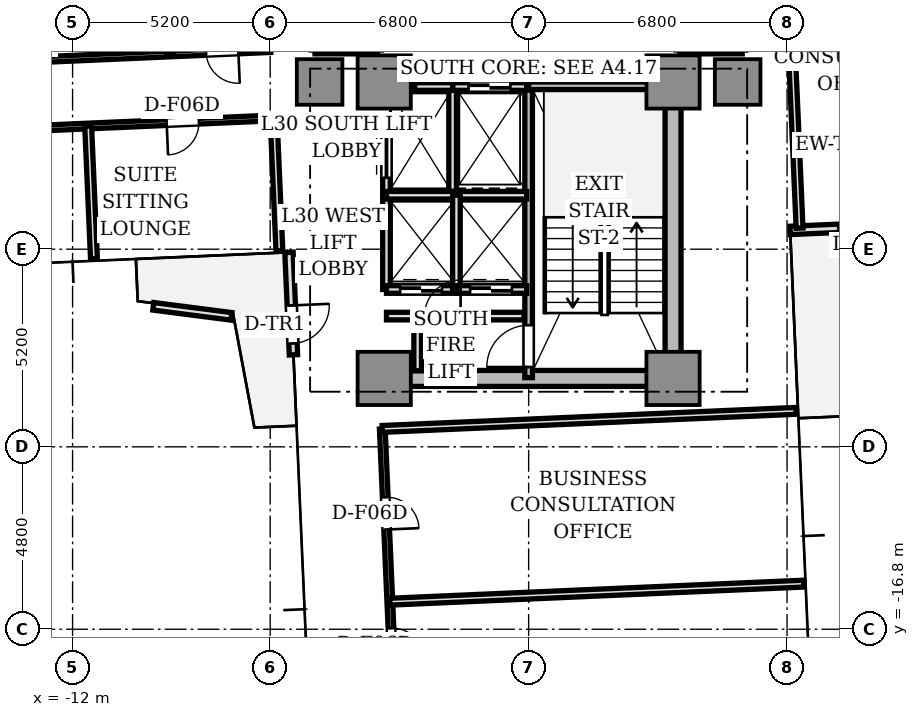
"""IFC4 building model, lengths in metres.
Left out: names, types, materials, properties, quantities, classifications, styles, units other than length and angle.
Written with IfcOpenShell. Run it as: python <this file> out.ifc"""

import sys

from ifc_helpers import new_model, si_unit, direction, frame, frame_2d, origin, origin_2d, place, context, subcontext, project, spatial, rectangle, extrude, source, transform, mapped, element, fill, save


model = new_model("IFC4")
c1 = context("Model", 3, precision=1e-05, world=origin(), true_north=direction((0.0, 1.0)))
c2 = subcontext(c1, "Body", "Model", "MODEL_VIEW")
j1 = project(units=[si_unit("LENGTHUNIT", "METRE"), si_unit("PLANEANGLEUNIT", "RADIAN")], contexts=[c1])
p1 = place(None, origin())
s1 = spatial("IfcSite", under=j1, at=p1, CompositionType="ELEMENT")
p2 = place(p1, origin())
s2 = spatial("IfcBuilding", under=s1, at=p2, CompositionType="ELEMENT")
p3 = place(p2, frame((0.0, 0.0, 111.45)))
s3 = spatial("IfcBuildingStorey", under=s2, at=p3, CompositionType="ELEMENT", Elevation=111.45)
p4 = place(p3, frame((-3.55, -10.2, 0.0), z_axis=(0.0, 0.0, 1.0), x_axis=(1.0, 0.0, 0.0)))
e1 = element("IfcWall", 1, at=p4, inside=s3, PredefinedType="SHEAR", context=c2, shape_type="SweptSolid", body=[
    extrude(rectangle(XDim=7.1, YDim=0.42, at=frame_2d((3.55, 0.0))), origin(), (0.0, 0.0, 1.0), 3.11),
])
p5 = place(p3, frame((3.8, -9.75, 0.0), z_axis=(0.0, 0.0, 1.0), x_axis=(0.0, 1.0, 0.0)))
e2 = element("IfcWall", 2, at=p5, inside=s3, PredefinedType="SHEAR", context=c2, shape_type="SweptSolid", body=[
    extrude(rectangle(XDim=6.9, YDim=0.42, at=frame_2d((3.45, 0.0))), origin(), (0.0, 0.0, 1.0), 3.11),
])
m1 = source(origin(), c2, "Body", "SweptSolid", [
    extrude(rectangle(XDim=1.4, YDim=1.4, at=origin_2d()), origin(), (0.0, 0.0, 1.0), 3.11),
])
for number, where, z_axis, x_axis in (
    (3, (-3.8, -2.4, 0.0), (0.0, 0.0, 1.0), (1.0, 0.0, 0.0)),
    (4, (3.8, -2.4, 0.0), (0.0, 0.0, 1.0), (1.0, 0.0, 0.0)),
    (5, (-3.8, -10.2, 0.0), (0.0, 0.0, 1.0), (1.0, 0.0, 0.0)),
    (6, (3.8, -10.2, 0.0), (0.0, 0.0, 1.0), (1.0, 0.0, 0.0)),
):
    element("IfcColumn", number, at=place(p3, frame(where, z_axis=z_axis, x_axis=x_axis)), inside=s3, PredefinedType="COLUMN", context=c2, shape_type="MappedRepresentation", body=[
        mapped(m1, transform((0.0, 0.0, 0.0), scale=1.0)),
    ])
m2 = source(origin(), c2, "Body", "SweptSolid", [
    extrude(rectangle(XDim=1.2, YDim=1.2, at=origin_2d()), origin(), (0.0, 0.0, 1.0), 3.11),
])
for number, where, z_axis, x_axis in (
    (7, (5.5, -2.4, 0.0), (0.0, 0.0, 1.0), (1.0, 0.0, 0.0)),
    (8, (-5.5, -2.4, 0.0), (0.0, 0.0, 1.0), (1.0, 0.0, 0.0)),
):
    element("IfcColumn", number, at=place(p3, frame(where, z_axis=z_axis, x_axis=x_axis)), inside=s3, PredefinedType="COLUMN", context=c2, shape_type="MappedRepresentation", body=[
        mapped(m2, transform((0.0, 0.0, 0.0), scale=1.0)),
    ])
p6 = place(p3, frame((6.882, -6.306, 0.0), z_axis=(0.0, 0.0, 1.0), x_axis=(0.999045894436, 0.043672655174, 0.0)))
e9 = element("IfcWall", 9, at=p6, inside=s3, PredefinedType="STANDARD", context=c2, shape_type="SweptSolid", body=[
    extrude(rectangle(XDim=2.7, YDim=0.22, at=frame_2d((1.35, 0.0))), origin(), (0.0, 0.0, 1.0), 3.11),
])
p7 = place(p6, frame((1.4, 0.0, 0.0)))
e10 = element("IfcOpeningElement", 10, at=p7, cuts=e9, PredefinedType="OPENING", context=c2, shape_type="SweptSolid", body=[
    extrude(rectangle(XDim=1.0, YDim=2.2, at=frame_2d((0.5, 1.1))), frame((0.0, 0.12, 0.0), z_axis=(0.0, -1.0, 0.0), x_axis=(1.0, 0.0, 0.0)), (0.0, 0.0, 1.0), 0.24),
])
p8 = place(p3, frame((-6.306, -6.882, 0.0), z_axis=(0.0, 0.0, 1.0), x_axis=(0.043672655174, -0.999045894436, 0.0)))
e11 = element("IfcWall", 11, at=p8, inside=s3, PredefinedType="STANDARD", context=c2, shape_type="SweptSolid", body=[
    extrude(rectangle(XDim=2.7, YDim=0.22, at=frame_2d((1.35, 0.0))), origin(), (0.0, 0.0, 1.0), 3.11),
])
p9 = place(p8, frame((1.4, 0.0, 0.0)))
e12 = element("IfcOpeningElement", 12, at=p9, cuts=e11, PredefinedType="OPENING", context=c2, shape_type="SweptSolid", body=[
    extrude(rectangle(XDim=1.0, YDim=2.2, at=frame_2d((0.5, 1.1))), frame((0.0, 0.12, 0.0), z_axis=(0.0, -1.0, 0.0), x_axis=(1.0, 0.0, 0.0)), (0.0, 0.0, 1.0), 0.24),
])
p10 = place(p3, frame((-9.875, -8.303, 0.0), z_axis=(0.0, 0.0, 1.0), x_axis=(0.991812557097, -0.127702198823, 0.0)))
e13 = element("IfcWall", 13, at=p10, inside=s3, PredefinedType="PARAPET", context=c2, shape_type="SweptSolid", body=[
    extrude(rectangle(XDim=2.072, YDim=0.2, at=frame_2d((1.036, 0.0))), origin(), (0.0, 0.0, 1.0), 0.65),
])
p11 = place(p3, frame((0.0, -10.18, 0.0), z_axis=(0.0, 0.0, 1.0), x_axis=(0.0, 1.0, 0.0)))
e14 = element("IfcWall", 14, at=p11, inside=s3, PredefinedType="SOLIDWALL", context=c2, shape_type="SweptSolid", body=[
    extrude(rectangle(XDim=7.68, YDim=0.2, at=frame_2d((3.84, 0.0))), origin(), (0.0, 0.0, 1.0), 3.11),
])
p12 = place(p11, frame((0.28, 0.0, 0.0)))
e15 = element("IfcOpeningElement", 15, at=p12, cuts=e14, PredefinedType="OPENING", context=c2, shape_type="SweptSolid", body=[
    extrude(rectangle(XDim=1.1, YDim=2.15, at=frame_2d((0.55, 1.075))), frame((0.0, 0.11, 0.0), z_axis=(0.0, -1.0, 0.0), x_axis=(1.0, 0.0, 0.0)), (0.0, 0.0, 1.0), 0.22),
])
p13 = place(p3, frame((0.0, -2.5, 0.0), z_axis=(0.0, 0.0, 1.0), x_axis=(1.0, 0.0, 0.0)))
e16 = element("IfcWall", 16, at=p13, inside=s3, PredefinedType="SOLIDWALL", context=c2, shape_type="SweptSolid", body=[
    extrude(rectangle(XDim=3.72, YDim=0.2, at=frame_2d((1.86, 0.0))), origin(), (0.0, 0.0, 1.0), 3.11),
])
p14 = place(p3, frame((-2.0, -5.28, 0.0), z_axis=(0.0, 0.0, 1.0), x_axis=(0.0, 1.0, 0.0)))
e17 = element("IfcWall", 17, at=p14, inside=s3, PredefinedType="SOLIDWALL", context=c2, shape_type="SweptSolid", body=[
    extrude(rectangle(XDim=2.78, YDim=0.2, at=frame_2d((1.39, 0.0))), origin(), (0.0, 0.0, 1.0), 2.66),
])
p15 = place(p3, frame((-2.0, -2.52, 0.0), z_axis=(0.0, 0.0, 1.0), x_axis=(1.0, 0.0, 0.0)))
e18 = element("IfcWall", 18, at=p15, inside=s3, PredefinedType="SOLIDWALL", context=c2, shape_type="SweptSolid", body=[
    extrude(rectangle(XDim=1.95, YDim=0.2, at=frame_2d((0.975, 0.0))), origin(), (0.0, 0.0, 1.0), 2.66),
])
p16 = place(p15, frame((0.42, 0.0, 0.0)))
e19 = element("IfcOpeningElement", 19, at=p16, cuts=e18, PredefinedType="OPENING", context=c2, shape_type="SweptSolid", body=[
    extrude(rectangle(XDim=1.1, YDim=2.2, at=frame_2d((0.55, 1.1))), frame((0.0, 0.11, 0.0), z_axis=(0.0, -1.0, 0.0), x_axis=(1.0, 0.0, 0.0)), (0.0, 0.0, 1.0), 0.22),
])
p17 = place(p3, frame((-3.0, -2.52, 0.0), z_axis=(0.0, 0.0, 1.0), x_axis=(1.0, 0.0, 0.0)))
e20 = element("IfcWall", 20, at=p17, inside=s3, PredefinedType="SOLIDWALL", context=c2, shape_type="SweptSolid", body=[
    extrude(rectangle(XDim=1.0, YDim=0.2, at=frame_2d((0.5, 0.0))), origin(), (0.0, 0.0, 1.0), 2.66),
])
p18 = place(p3, frame((-3.74, -5.36, 0.0), z_axis=(0.0, 0.0, 1.0), x_axis=(0.0, 1.0, 0.0)))
e21 = element("IfcWall", 21, at=p18, inside=s3, PredefinedType="SOLIDWALL", context=c2, shape_type="SweptSolid", body=[
    extrude(rectangle(XDim=2.08, YDim=0.2, at=frame_2d((1.04, 0.0))), origin(), (0.0, 0.0, 1.0), 2.66),
])
p19 = place(p18, frame((0.44, 0.0, 0.0)))
e22 = element("IfcOpeningElement", 22, at=p19, cuts=e21, PredefinedType="OPENING", context=c2, shape_type="SweptSolid", body=[
    extrude(rectangle(XDim=1.2, YDim=2.2, at=frame_2d((0.6, 1.1))), frame((0.0, 0.11, 0.0), z_axis=(0.0, -1.0, 0.0), x_axis=(1.0, 0.0, 0.0)), (0.0, 0.0, 1.0), 0.22),
])
p20 = place(p3, frame((-3.74, -7.86, 0.0), z_axis=(0.0, 0.0, 1.0), x_axis=(0.0, 1.0, 0.0)))
e23 = element("IfcWall", 23, at=p20, inside=s3, PredefinedType="SOLIDWALL", context=c2, shape_type="SweptSolid", body=[
    extrude(rectangle(XDim=2.48, YDim=0.2, at=frame_2d((1.24, 0.0))), origin(), (0.0, 0.0, 1.0), 2.66),
])
p21 = place(p3, frame((-3.74, -7.86, 0.0), z_axis=(0.0, 0.0, 1.0), x_axis=(1.0, 0.0, 0.0)))
e24 = element("IfcWall", 24, at=p21, inside=s3, PredefinedType="SOLIDWALL", context=c2, shape_type="SweptSolid", body=[
    extrude(rectangle(XDim=1.84, YDim=0.2, at=frame_2d((0.92, 0.0))), origin(), (0.0, 0.0, 1.0), 2.66),
])
p22 = place(p21, frame((0.36, 0.0, 0.0)))
e25 = element("IfcOpeningElement", 25, at=p22, cuts=e24, PredefinedType="OPENING", context=c2, shape_type="SweptSolid", body=[
    extrude(rectangle(XDim=1.1, YDim=2.2, at=frame_2d((0.55, 1.1))), frame((0.0, 0.11, 0.0), z_axis=(0.0, -1.0, 0.0), x_axis=(1.0, 0.0, 0.0)), (0.0, 0.0, 1.0), 0.22),
])
p23 = place(p3, frame((-3.74, -5.38, 0.0), z_axis=(0.0, 0.0, 1.0), x_axis=(1.0, 0.0, 0.0)))
e26 = element("IfcWall", 26, at=p23, inside=s3, PredefinedType="SOLIDWALL", context=c2, shape_type="SweptSolid", body=[
    extrude(rectangle(XDim=3.69, YDim=0.2, at=frame_2d((1.845, 0.0))), origin(), (0.0, 0.0, 1.0), 2.66),
])
p24 = place(p3, frame((-1.9, -7.86, 0.0), z_axis=(0.0, 0.0, 1.0), x_axis=(0.0, 1.0, 0.0)))
e27 = element("IfcWall", 27, at=p24, inside=s3, PredefinedType="SOLIDWALL", context=c2, shape_type="SweptSolid", body=[
    extrude(rectangle(XDim=2.48, YDim=0.2, at=frame_2d((1.24, 0.0))), origin(), (0.0, 0.0, 1.0), 2.66),
])
p25 = place(p3, frame((-1.9, -7.86, 0.0), z_axis=(0.0, 0.0, 1.0), x_axis=(1.0, 0.0, 0.0)))
e28 = element("IfcWall", 28, at=p25, inside=s3, PredefinedType="SOLIDWALL", context=c2, shape_type="SweptSolid", body=[
    extrude(rectangle(XDim=1.85, YDim=0.2, at=frame_2d((0.925, 0.0))), origin(), (0.0, 0.0, 1.0), 2.66),
])
p26 = place(p25, frame((0.36, 0.0, 0.0)))
e29 = element("IfcOpeningElement", 29, at=p26, cuts=e28, PredefinedType="OPENING", context=c2, shape_type="SweptSolid", body=[
    extrude(rectangle(XDim=1.1, YDim=2.2, at=frame_2d((0.55, 1.1))), frame((0.0, 0.11, 0.0), z_axis=(0.0, -1.0, 0.0), x_axis=(1.0, 0.0, 0.0)), (0.0, 0.0, 1.0), 0.22),
])
for number, where, z_axis, x_axis in (
    (30, (3.98, -1.56, 0.0), (0.0, 0.0, 1.0), (1.0, 0.0, 0.0)),
    (31, (-5.62, -1.56, 0.0), (0.0, 0.0, 1.0), (1.0, 0.0, 0.0)),
):
    element("IfcWall", number, at=place(p3, frame(where, z_axis=z_axis, x_axis=x_axis)), inside=s3, PredefinedType="SOLIDWALL", context=c2, shape_type="SweptSolid", body=[
        extrude(rectangle(XDim=1.64, YDim=0.2, at=frame_2d((0.82, 0.0))), origin(), (0.0, 0.0, 1.0), 2.66),
    ])
p27 = place(p3, frame((-3.74, -8.56, 0.0), z_axis=(0.0, 0.0, 1.0), x_axis=(1.0, 0.0, 0.0)))
e32 = element("IfcWall", 32, at=p27, inside=s3, PredefinedType="SOLIDWALL", context=c2, shape_type="SweptSolid", body=[
    extrude(rectangle(XDim=3.62, YDim=0.2, at=frame_2d((1.81, 0.0))), origin(), (0.0, 0.0, 1.0), 2.66),
])
p28 = place(p27, frame((1.0, 0.0, 0.0)))
e33 = element("IfcOpeningElement", 33, at=p28, cuts=e32, PredefinedType="OPENING", context=c2, shape_type="SweptSolid", body=[
    extrude(rectangle(XDim=0.95, YDim=2.15, at=frame_2d((0.475, 1.075))), frame((0.0, 0.11, 0.0), z_axis=(0.0, -1.0, 0.0), x_axis=(1.0, 0.0, 0.0)), (0.0, 0.0, 1.0), 0.22),
])
p29 = place(p3, frame((-2.92, -10.0, 0.0), z_axis=(0.0, 0.0, 1.0), x_axis=(0.0, 1.0, 0.0)))
e34 = element("IfcWall", 34, at=p29, inside=s3, PredefinedType="SOLIDWALL", context=c2, shape_type="SweptSolid", body=[
    extrude(rectangle(XDim=1.44, YDim=0.2, at=frame_2d((0.72, 0.0))), origin(), (0.0, 0.0, 1.0), 2.66),
])
p30 = place(p3, frame((7.129, -6.245, 0.0), z_axis=(0.0, 0.0, 1.0), x_axis=(-0.043600217373, 0.999049058378, 0.0)))
e35 = element("IfcWall", 35, at=p30, inside=s3, PredefinedType="PARTITIONING", context=c2, shape_type="SweptSolid", body=[
    extrude(rectangle(XDim=7.8, YDim=0.18, at=frame_2d((3.9, 0.0))), origin(), (0.0, 0.0, 1.0), 2.66),
])
p31 = place(p3, frame((-6.71, -3.346, 0.0), z_axis=(0.0, 0.0, 1.0), x_axis=(-0.999048535483, -0.04361219725, 0.0)))
e36 = element("IfcWall", 36, at=p31, inside=s3, PredefinedType="PARTITIONING", context=c2, shape_type="SweptSolid", body=[
    extrude(rectangle(XDim=13.2, YDim=0.15, at=frame_2d((6.6, 0.0))), origin(), (0.0, 0.0, 1.0), 2.63),
])
p32 = place(p31, frame((1.967, 0.0, 0.0)))
e37 = element("IfcOpeningElement", 37, at=p32, cuts=e36, PredefinedType="OPENING", context=c2, shape_type="SweptSolid", body=[
    extrude(rectangle(XDim=0.85, YDim=2.1, at=frame_2d((0.425, 1.05))), frame((0.0, 0.085, 0.0), z_axis=(0.0, -1.0, 0.0), x_axis=(1.0, 0.0, 0.0)), (0.0, 0.0, 1.0), 0.17),
])
p33 = place(p31, frame((7.342, 0.0, 0.0)))
e38 = element("IfcOpeningElement", 38, at=p33, cuts=e36, PredefinedType="OPENING", context=c2, shape_type="SweptSolid", body=[
    extrude(rectangle(XDim=0.85, YDim=2.1, at=frame_2d((0.425, 1.05))), frame((0.0, 0.085, 0.0), z_axis=(0.0, -1.0, 0.0), x_axis=(1.0, 0.0, 0.0)), (0.0, 0.0, 1.0), 0.17),
])
p34 = place(p3, frame((-6.789, -1.548, 0.0), z_axis=(0.0, 0.0, 1.0), x_axis=(-0.999048500303, -0.043613003123, 0.0)))
e39 = element("IfcWall", 39, at=p34, inside=s3, PredefinedType="PARTITIONING", context=c2, shape_type="SweptSolid", body=[
    extrude(rectangle(XDim=13.2, YDim=0.15, at=frame_2d((6.6, 0.0))), origin(), (0.0, 0.0, 1.0), 2.66),
])
p35 = place(p34, frame((0.85, 0.0, 0.0)))
e40 = element("IfcOpeningElement", 40, at=p35, cuts=e39, PredefinedType="OPENING", context=c2, shape_type="SweptSolid", body=[
    extrude(rectangle(XDim=0.85, YDim=2.1, at=frame_2d((0.425, 1.05))), frame((0.0, 0.085, 0.0), z_axis=(0.0, -1.0, 0.0), x_axis=(1.0, 0.0, 0.0)), (0.0, 0.0, 1.0), 0.17),
])
p36 = place(p34, frame((6.225, 0.0, 0.0)))
e41 = element("IfcOpeningElement", 41, at=p36, cuts=e39, PredefinedType="OPENING", context=c2, shape_type="SweptSolid", body=[
    extrude(rectangle(XDim=0.85, YDim=2.1, at=frame_2d((0.425, 1.05))), frame((0.0, 0.085, 0.0), z_axis=(0.0, -1.0, 0.0), x_axis=(1.0, 0.0, 0.0)), (0.0, 0.0, 1.0), 0.17),
])
p37 = place(p3, frame((-6.71, -3.346, 0.0), z_axis=(0.0, 0.0, 1.0), x_axis=(0.043597663116, -0.999049169846, 0.0)))
e42 = element("IfcWall", 42, at=p37, inside=s3, PredefinedType="PARTITIONING", context=c2, shape_type="SweptSolid", body=[
    extrude(rectangle(XDim=3.5, YDim=0.18, at=frame_2d((1.75, 0.0))), origin(), (0.0, 0.0, 1.0), 2.66),
])
p38 = place(p3, frame((-11.59, -3.559, 0.0), z_axis=(0.0, 0.0, 1.0), x_axis=(0.04366424353, -0.99904626211, 0.0)))
e43 = element("IfcWall", 43, at=p38, inside=s3, PredefinedType="PARTITIONING", context=c2, shape_type="SweptSolid", body=[
    extrude(rectangle(XDim=3.5, YDim=0.18, at=frame_2d((1.75, 0.0))), origin(), (0.0, 0.0, 1.0), 2.66),
])
p39 = place(p3, frame((-9.436, -1.663, 0.0), z_axis=(0.0, 0.0, 1.0), x_axis=(-0.043632821702, 0.999047634936, 0.0)))
e44 = element("IfcWall", 44, at=p39, inside=s3, PredefinedType="PARTITIONING", context=c2, shape_type="SweptSolid", body=[
    extrude(rectangle(XDim=7.8, YDim=0.18, at=frame_2d((3.9, 0.0))), origin(), (0.0, 0.0, 1.0), 2.66),
])
p40 = place(p3, frame((-3.851, -11.529, 0.0), z_axis=(0.0, 0.0, 1.0), x_axis=(0.043638220751, -0.999047399121, 0.0)))
e45 = element("IfcWall", 45, at=p40, inside=s3, PredefinedType="PARTITIONING", context=c2, shape_type="SweptSolid", body=[
    extrude(rectangle(XDim=8.75, YDim=0.15, at=frame_2d((4.375, 0.0))), origin(), (0.0, 0.0, 1.0), 2.63),
])
p41 = place(p40, frame((1.8, 0.0, 0.0)))
e46 = element("IfcOpeningElement", 46, at=p41, cuts=e45, PredefinedType="OPENING", context=c2, shape_type="SweptSolid", body=[
    extrude(rectangle(XDim=0.85, YDim=2.1, at=frame_2d((0.425, 1.05))), frame((0.0, 0.085, 0.0), z_axis=(0.0, -1.0, 0.0), x_axis=(1.0, 0.0, 0.0)), (0.0, 0.0, 1.0), 0.17),
])
p42 = place(p40, frame((5.25, 0.0, 0.0)))
e47 = element("IfcOpeningElement", 47, at=p42, cuts=e45, PredefinedType="OPENING", context=c2, shape_type="SweptSolid", body=[
    extrude(rectangle(XDim=0.85, YDim=2.1, at=frame_2d((0.425, 1.05))), frame((0.0, 0.085, 0.0), z_axis=(0.0, -1.0, 0.0), x_axis=(1.0, 0.0, 0.0)), (0.0, 0.0, 1.0), 0.17),
])
p43 = place(p3, frame((-3.851, -11.529, 0.0), z_axis=(0.0, 0.0, 1.0), x_axis=(0.999048663393, 0.043609267053, 0.0)))
e48 = element("IfcWall", 48, at=p43, inside=s3, PredefinedType="PARTITIONING", context=c2, shape_type="SweptSolid", body=[
    extrude(rectangle(XDim=10.9, YDim=0.18, at=frame_2d((5.45, 0.0))), origin(), (0.0, 0.0, 1.0), 2.66),
])
p44 = place(p3, frame((-3.652, -16.075, 0.0), z_axis=(0.0, 0.0, 1.0), x_axis=(0.999047687305, 0.043631622609, 0.0)))
e49 = element("IfcWall", 49, at=p44, inside=s3, PredefinedType="PARTITIONING", context=c2, shape_type="SweptSolid", body=[
    extrude(rectangle(XDim=10.9, YDim=0.18, at=frame_2d((5.45, 0.0))), origin(), (0.0, 0.0, 1.0), 2.66),
])
m3 = source(origin(), c2, "Body", "SweptSolid", [
    extrude(rectangle(XDim=1.0, YDim=0.05, at=origin_2d()), origin(), (0.0, 0.0, 1.0), 2.2),
])
p45 = place(p9, frame((0.5, 0.0, 0.0)))
e50 = element("IfcDoor", 50, at=p45, inside=s3, OperationType="SINGLE_SWING_LEFT", PredefinedType="DOOR", context=c2, shape_type="MappedRepresentation", body=[
    mapped(m3, transform((0.0, 0.0, 0.0), scale=1.0)),
])
fill(e12, e50)
m4 = source(origin(), c2, "Body", "SweptSolid", [
    extrude(rectangle(XDim=1.1, YDim=0.05, at=origin_2d()), origin(), (0.0, 0.0, 1.0), 2.2),
])
p46 = place(p16, frame((0.55, 0.0, 0.0)))
e51 = element("IfcDoor", 51, at=p46, inside=s3, OperationType="DOUBLE_DOOR_SLIDING", PredefinedType="DOOR", context=c2, shape_type="MappedRepresentation", body=[
    mapped(m4, transform((0.0, 0.0, 0.0), scale=1.0)),
])
fill(e19, e51)
m5 = source(origin(), c2, "Body", "SweptSolid", [
    extrude(rectangle(XDim=1.2, YDim=0.05, at=origin_2d()), origin(), (0.0, 0.0, 1.0), 2.2),
])
p47 = place(p19, frame((0.6, 0.0, 0.0)))
e52 = element("IfcDoor", 52, at=p47, inside=s3, OperationType="DOUBLE_DOOR_SLIDING", PredefinedType="DOOR", context=c2, shape_type="MappedRepresentation", body=[
    mapped(m5, transform((0.0, 0.0, 0.0), scale=1.0)),
])
fill(e22, e52)
p48 = place(p22, frame((0.55, 0.0, 0.0)))
e53 = element("IfcDoor", 53, at=p48, inside=s3, OperationType="DOUBLE_DOOR_SLIDING", PredefinedType="DOOR", context=c2, shape_type="MappedRepresentation", body=[
    mapped(m4, transform((0.0, 0.0, 0.0), scale=1.0)),
])
fill(e25, e53)
p49 = place(p26, frame((0.55, 0.0, 0.0)))
e54 = element("IfcDoor", 54, at=p49, inside=s3, OperationType="DOUBLE_DOOR_SLIDING", PredefinedType="DOOR", context=c2, shape_type="MappedRepresentation", body=[
    mapped(m4, transform((0.0, 0.0, 0.0), scale=1.0)),
])
fill(e29, e54)
m6 = source(origin(), c2, "Body", "SweptSolid", [
    extrude(rectangle(XDim=1.1, YDim=0.05, at=origin_2d()), origin(), (0.0, 0.0, 1.0), 2.15),
])
p50 = place(p12, frame((0.55, 0.0, 0.0)))
e55 = element("IfcDoor", 55, at=p50, inside=s3, OperationType="SINGLE_SWING_LEFT", PredefinedType="DOOR", context=c2, shape_type="MappedRepresentation", body=[
    mapped(m6, transform((0.0, 0.0, 0.0), scale=1.0)),
])
fill(e15, e55)
m7 = source(origin(), c2, "Body", "SweptSolid", [
    extrude(rectangle(XDim=0.95, YDim=0.05, at=origin_2d()), origin(), (0.0, 0.0, 1.0), 2.15),
])
p51 = place(p28, frame((0.475, 0.0, 0.0)))
e56 = element("IfcDoor", 56, at=p51, inside=s3, OperationType="SINGLE_SWING_RIGHT", PredefinedType="DOOR", context=c2, shape_type="MappedRepresentation", body=[
    mapped(m7, transform((0.0, 0.0, 0.0), scale=1.0)),
])
fill(e33, e56)
m8 = source(origin(), c2, "Body", "SweptSolid", [
    extrude(rectangle(XDim=0.85, YDim=0.05, at=origin_2d()), origin(), (0.0, 0.0, 1.0), 2.1),
])
p52 = place(p32, frame((0.425, 0.0, 0.0)))
e57 = element("IfcDoor", 57, at=p52, inside=s3, OperationType="SINGLE_SWING_RIGHT", PredefinedType="DOOR", context=c2, shape_type="MappedRepresentation", body=[
    mapped(m8, transform((0.0, 0.0, 0.0), scale=1.0)),
])
fill(e37, e57)
p53 = place(p35, frame((0.425, 0.0, 0.0)))
e58 = element("IfcDoor", 58, at=p53, inside=s3, OperationType="SINGLE_SWING_LEFT", PredefinedType="DOOR", context=c2, shape_type="MappedRepresentation", body=[
    mapped(m8, transform((0.0, 0.0, 0.0), scale=1.0)),
])
fill(e40, e58)
p54 = place(p41, frame((0.425, 0.0, 0.0)))
e59 = element("IfcDoor", 59, at=p54, inside=s3, OperationType="SINGLE_SWING_RIGHT", PredefinedType="DOOR", context=c2, shape_type="MappedRepresentation", body=[
    mapped(m8, transform((0.0, 0.0, 0.0), scale=1.0)),
])
fill(e46, e59)
p55 = place(p42, frame((0.425, 0.0, 0.0)))
e60 = element("IfcDoor", 60, at=p55, inside=s3, OperationType="SINGLE_SWING_RIGHT", PredefinedType="DOOR", context=c2, shape_type="MappedRepresentation", body=[
    mapped(m8, transform((0.0, 0.0, 0.0), scale=1.0)),
])
fill(e47, e60)
save(model, sys.argv[1])
